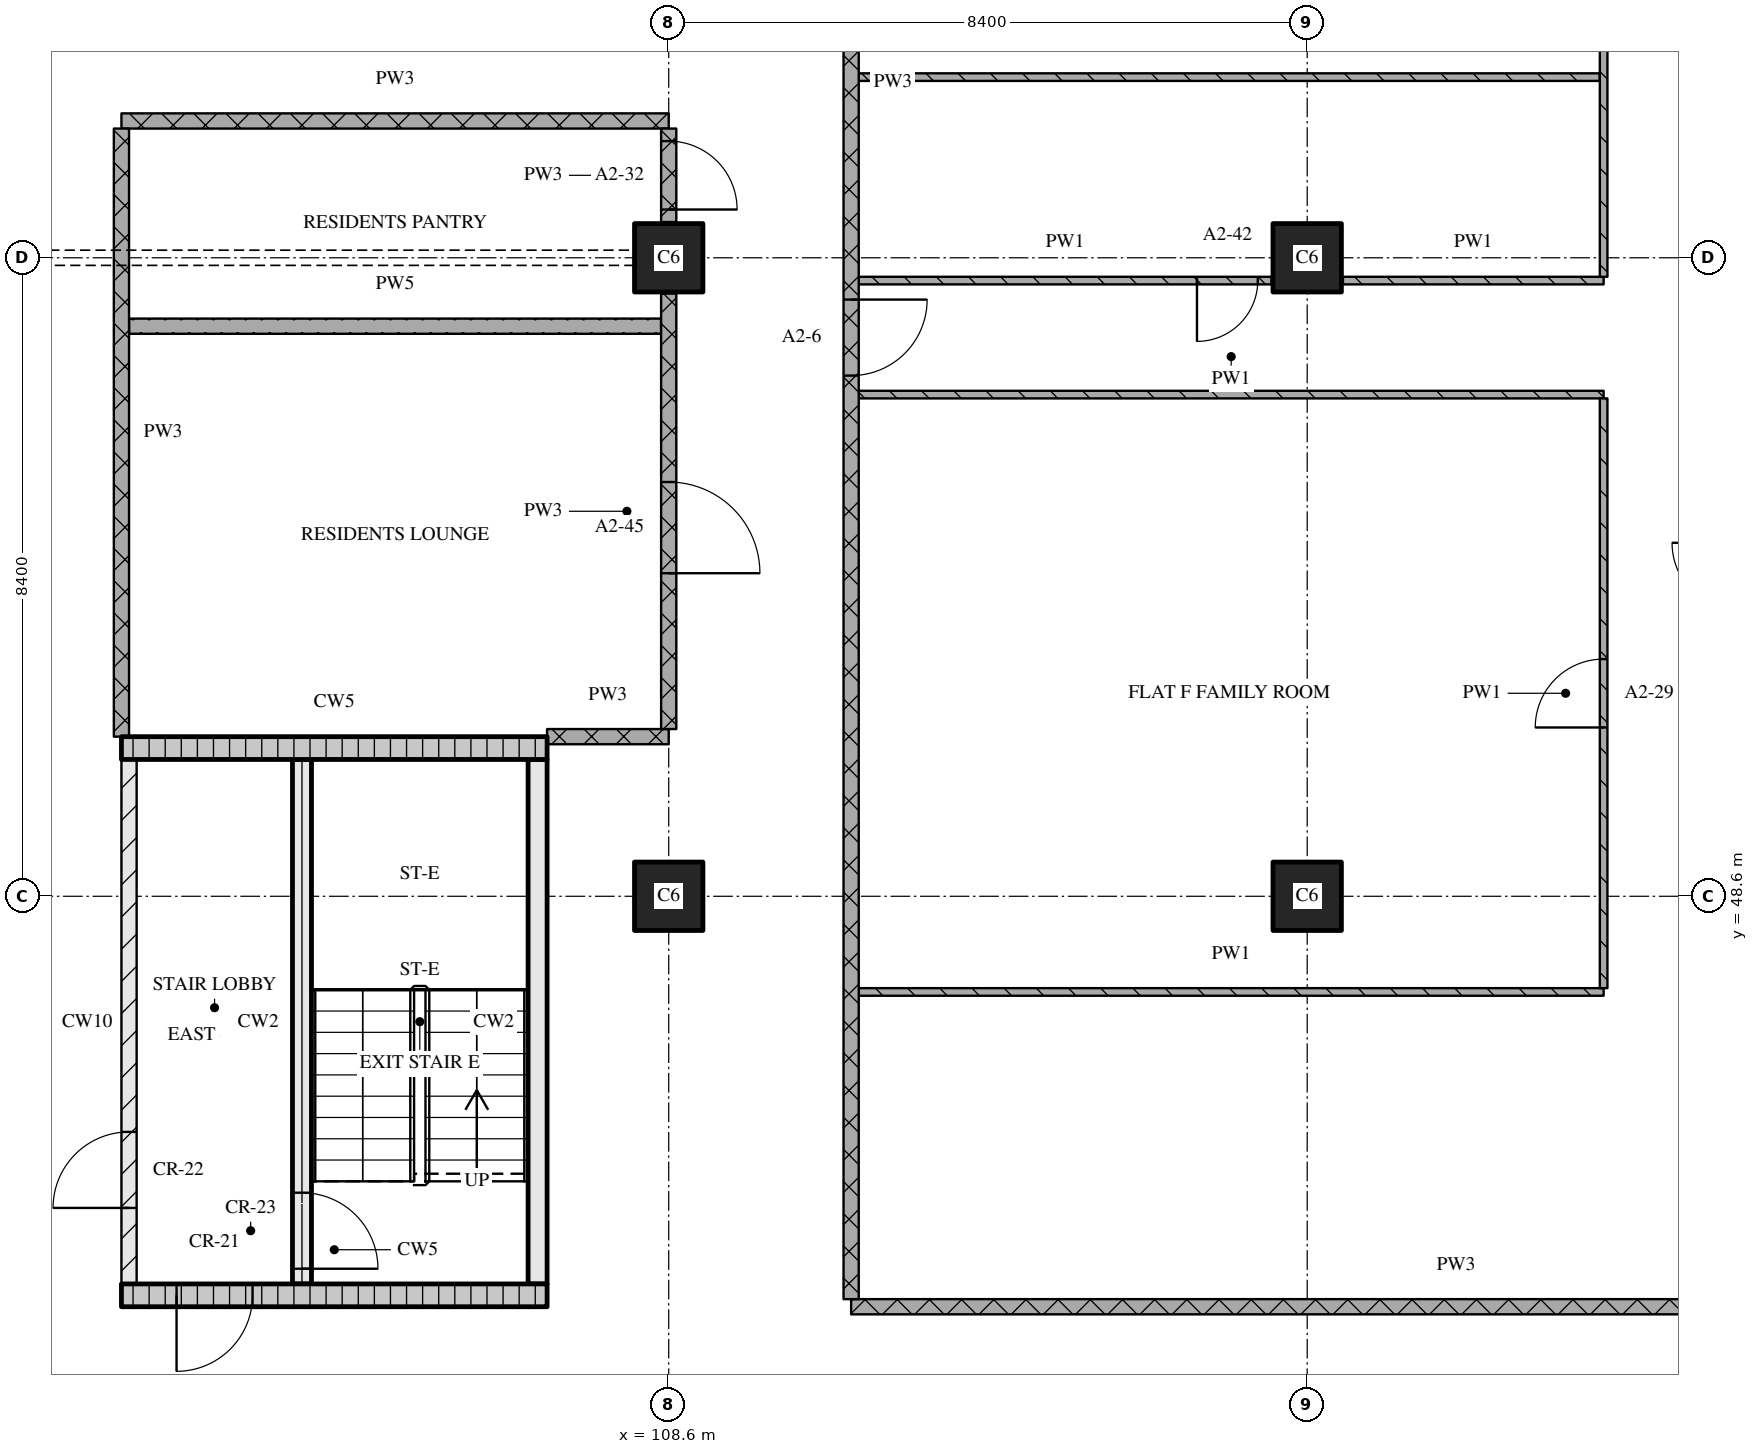
"""IFC4 building model, lengths in metres.
Left out: names, types, materials, properties, quantities, classifications, styles, units other than length and angle.
Written with IfcOpenShell. Run it as: python <this file> out.ifc"""

import sys

from ifc_helpers import new_model, si_unit, direction, frame, frame_2d, origin, origin_2d, place, context, subcontext, project, spatial, rectangle, extrude, element, fill, save


model = new_model("IFC4")
c1 = context("Model", 3, precision=1e-05, world=origin(), true_north=direction((0.0, 1.0)))
c2 = subcontext(c1, "Body", "Model", "MODEL_VIEW")
j1 = project(units=[si_unit("LENGTHUNIT", "METRE"), si_unit("PLANEANGLEUNIT", "RADIAN")], contexts=[c1])
p1 = place(None, origin())
s1 = spatial("IfcSite", under=j1, at=p1, CompositionType="ELEMENT")
p2 = place(p1, origin())
s2 = spatial("IfcBuilding", under=s1, at=p2, CompositionType="ELEMENT")
p3 = place(p2, frame((0.0, 0.0, 55.2)))
s3 = spatial("IfcBuildingStorey", under=s2, at=p3, CompositionType="ELEMENT", Elevation=55.2)
for number, where, z_axis, x_axis in (
    (1, (108.6, 48.6, 0.0), (0.0, 0.0, 1.0), (1.0, 0.0, 0.0)),
    (2, (108.6, 57.0, 0.0), (0.0, 0.0, 1.0), (1.0, 0.0, 0.0)),
    (3, (117.0, 48.6, 0.0), (0.0, 0.0, 1.0), (1.0, 0.0, 0.0)),
    (4, (117.0, 57.0, 0.0), (0.0, 0.0, 1.0), (1.0, 0.0, 0.0)),
):
    element("IfcColumn", number, at=place(p3, frame(where, z_axis=z_axis, x_axis=x_axis)), inside=s3, PredefinedType="COLUMN", context=c2, shape_type="SweptSolid", body=[
        extrude(rectangle(XDim=0.9, YDim=0.9, at=origin_2d()), origin(), (0.0, 0.0, 1.0), 3.6),
    ])
p4 = place(p3, frame((101.4, 43.35, 0.0), z_axis=(0.0, 0.0, 1.0), x_axis=(1.0, 0.0, 0.0)))
e5 = element("IfcWall", 5, at=p4, inside=s3, PredefinedType="SOLIDWALL", context=c2, shape_type="SweptSolid", body=[
    extrude(rectangle(XDim=5.6, YDim=0.3, at=frame_2d((2.8, 0.0))), origin(), (0.0, 0.0, 1.0), 3.32),
])
p5 = place(p4, frame((0.725, 0.0, 0.0)))
e6 = element("IfcOpeningElement", 6, at=p5, cuts=e5, PredefinedType="OPENING", context=c2, shape_type="SweptSolid", body=[
    extrude(rectangle(XDim=1.0, YDim=2.1, at=frame_2d((0.5, 1.05))), frame((0.0, 0.16, 0.0), z_axis=(0.0, -1.0, 0.0), x_axis=(1.0, 0.0, 0.0)), (0.0, 0.0, 1.0), 0.32),
])
p6 = place(p3, frame((101.5, 43.5, 0.0), z_axis=(0.0, 0.0, 1.0), x_axis=(0.0, 1.0, 0.0)))
e7 = element("IfcWall", 7, at=p6, inside=s3, PredefinedType="PARTITIONING", context=c2, shape_type="SweptSolid", body=[
    extrude(rectangle(XDim=6.9, YDim=0.2, at=frame_2d((3.45, 0.0))), origin(), (0.0, 0.0, 1.0), 3.32),
])
p7 = place(p6, frame((1.0, 0.0, 0.0)))
e8 = element("IfcOpeningElement", 8, at=p7, cuts=e7, PredefinedType="OPENING", context=c2, shape_type="SweptSolid", body=[
    extrude(rectangle(XDim=1.0, YDim=2.1, at=frame_2d((0.5, 1.05))), frame((0.0, 0.11, 0.0), z_axis=(0.0, -1.0, 0.0), x_axis=(1.0, 0.0, 0.0)), (0.0, 0.0, 1.0), 0.22),
])
p8 = place(p3, frame((103.775, 43.5, 0.0), z_axis=(0.0, 0.0, 1.0), x_axis=(0.0, 1.0, 0.0)))
e9 = element("IfcWall", 9, at=p8, inside=s3, PredefinedType="SOLIDWALL", context=c2, shape_type="SweptSolid", body=[
    extrude(rectangle(XDim=6.9, YDim=0.25, at=frame_2d((3.45, 0.0))), origin(), (0.0, 0.0, 1.0), 3.32),
])
p9 = place(p8, frame((0.2, 0.0, 0.0)))
e10 = element("IfcOpeningElement", 10, at=p9, cuts=e9, PredefinedType="OPENING", context=c2, shape_type="SweptSolid", body=[
    extrude(rectangle(XDim=1.0, YDim=2.1, at=frame_2d((0.5, 1.05))), frame((0.0, 0.135, 0.0), z_axis=(0.0, -1.0, 0.0), x_axis=(1.0, 0.0, 0.0)), (0.0, 0.0, 1.0), 0.27),
])
p10 = place(p3, frame((106.875, 43.5, 0.0), z_axis=(0.0, 0.0, 1.0), x_axis=(0.0, 1.0, 0.0)))
e11 = element("IfcWall", 11, at=p10, inside=s3, PredefinedType="SOLIDWALL", context=c2, shape_type="SweptSolid", body=[
    extrude(rectangle(XDim=6.9, YDim=0.25, at=frame_2d((3.45, 0.0))), origin(), (0.0, 0.0, 1.0), 3.32),
])
p11 = place(p3, frame((101.4, 50.55, 0.0), z_axis=(0.0, 0.0, 1.0), x_axis=(1.0, 0.0, 0.0)))
e12 = element("IfcWall", 12, at=p11, inside=s3, PredefinedType="SOLIDWALL", context=c2, shape_type="SweptSolid", body=[
    extrude(rectangle(XDim=5.6, YDim=0.3, at=frame_2d((2.8, 0.0))), origin(), (0.0, 0.0, 1.0), 3.32),
])
p12 = place(p3, frame((111.0, 43.2, 0.0), z_axis=(0.0, 0.0, 1.0), x_axis=(1.0, 0.0, 0.0)))
e13 = element("IfcWall", 13, at=p12, inside=s3, PredefinedType="PARTITIONING", context=c2, shape_type="SweptSolid", body=[
    extrude(rectangle(XDim=15.92, YDim=0.2, at=frame_2d((7.96, 0.0))), origin(), (0.0, 0.0, 1.0), 3.32),
])
p13 = place(p3, frame((111.1, 47.341, 0.0), z_axis=(0.0, 0.0, 1.0), x_axis=(1.0, 0.0, 0.0)))
e14 = element("IfcWall", 14, at=p13, inside=s3, PredefinedType="PARTITIONING", context=c2, shape_type="SweptSolid", body=[
    extrude(rectangle(XDim=9.8, YDim=0.1, at=frame_2d((4.9, 0.0))), origin(), (0.0, 0.0, 1.0), 3.32),
])
p14 = place(p3, frame((107.0, 50.7, 0.0), z_axis=(0.0, 0.0, 1.0), x_axis=(1.0, 0.0, 0.0)))
e15 = element("IfcWall", 15, at=p14, inside=s3, PredefinedType="PARTITIONING", context=c2, shape_type="SweptSolid", body=[
    extrude(rectangle(XDim=1.6, YDim=0.2, at=frame_2d((0.8, 0.0))), origin(), (0.0, 0.0, 1.0), 3.32),
])
p15 = place(p3, frame((111.1, 55.2, 0.0), z_axis=(0.0, 0.0, 1.0), x_axis=(1.0, 0.0, 0.0)))
e16 = element("IfcWall", 16, at=p15, inside=s3, PredefinedType="PARTITIONING", context=c2, shape_type="SweptSolid", body=[
    extrude(rectangle(XDim=9.8, YDim=0.1, at=frame_2d((4.9, 0.0))), origin(), (0.0, 0.0, 1.0), 3.32),
])
p16 = place(p3, frame((101.5, 56.1, 0.0), z_axis=(0.0, 0.0, 1.0), x_axis=(1.0, 0.0, 0.0)))
e17 = element("IfcWall", 17, at=p16, inside=s3, PredefinedType="PARTITIONING", context=c2, shape_type="SweptSolid", body=[
    extrude(rectangle(XDim=7.0, YDim=0.2, at=frame_2d((3.5, 0.0))), origin(), (0.0, 0.0, 1.0), 3.32),
])
p17 = place(p3, frame((111.1, 56.7, 0.0), z_axis=(0.0, 0.0, 1.0), x_axis=(1.0, 0.0, 0.0)))
e18 = element("IfcWall", 18, at=p17, inside=s3, PredefinedType="PARTITIONING", context=c2, shape_type="SweptSolid", body=[
    extrude(rectangle(XDim=5.43, YDim=0.1, at=frame_2d((2.715, 0.0))), origin(), (0.0, 0.0, 1.0), 3.32),
])
p18 = place(p17, frame((4.45, 0.0, 0.0)))
e19 = element("IfcOpeningElement", 19, at=p18, cuts=e18, PredefinedType="OPENING", context=c2, shape_type="SweptSolid", body=[
    extrude(rectangle(XDim=0.8, YDim=2.1, at=frame_2d((0.4, 1.05))), frame((0.0, 0.06, 0.0), z_axis=(0.0, -1.0, 0.0), x_axis=(1.0, 0.0, 0.0)), (0.0, 0.0, 1.0), 0.12),
])
p19 = place(p3, frame((117.47, 56.7, 0.0), z_axis=(0.0, 0.0, 1.0), x_axis=(1.0, 0.0, 0.0)))
e20 = element("IfcWall", 20, at=p19, inside=s3, PredefinedType="PARTITIONING", context=c2, shape_type="SweptSolid", body=[
    extrude(rectangle(XDim=3.43, YDim=0.1, at=frame_2d((1.715, 0.0))), origin(), (0.0, 0.0, 1.0), 3.32),
])
p20 = place(p3, frame((101.4, 58.8, 0.0), z_axis=(0.0, 0.0, 1.0), x_axis=(1.0, 0.0, 0.0)))
e21 = element("IfcWall", 21, at=p20, inside=s3, PredefinedType="PARTITIONING", context=c2, shape_type="SweptSolid", body=[
    extrude(rectangle(XDim=7.2, YDim=0.2, at=frame_2d((3.6, 0.0))), origin(), (0.0, 0.0, 1.0), 3.32),
])
p21 = place(p3, frame((111.1, 59.377, 0.0), z_axis=(0.0, 0.0, 1.0), x_axis=(1.0, 0.0, 0.0)))
e22 = element("IfcWall", 22, at=p21, inside=s3, PredefinedType="PARTITIONING", context=c2, shape_type="SweptSolid", body=[
    extrude(rectangle(XDim=9.75, YDim=0.1, at=frame_2d((4.875, 0.0))), origin(), (0.0, 0.0, 1.0), 3.32),
])
p22 = place(p3, frame((101.4, 58.7, 0.0), z_axis=(0.0, 0.0, 1.0), x_axis=(0.0, -1.0, 0.0)))
e23 = element("IfcWall", 23, at=p22, inside=s3, PredefinedType="PARTITIONING", context=c2, shape_type="SweptSolid", body=[
    extrude(rectangle(XDim=8.0, YDim=0.2, at=frame_2d((4.0, 0.0))), origin(), (0.0, 0.0, 1.0), 3.32),
])
p23 = place(p3, frame((108.6, 50.8, 0.0), z_axis=(0.0, 0.0, 1.0), x_axis=(0.0, 1.0, 0.0)))
e24 = element("IfcWall", 24, at=p23, inside=s3, PredefinedType="PARTITIONING", context=c2, shape_type="SweptSolid", body=[
    extrude(rectangle(XDim=5.73, YDim=0.2, at=frame_2d((2.865, 0.0))), origin(), (0.0, 0.0, 1.0), 3.32),
])
p24 = place(p23, frame((2.05, 0.0, 0.0)))
e25 = element("IfcOpeningElement", 25, at=p24, cuts=e24, PredefinedType="OPENING", context=c2, shape_type="SweptSolid", body=[
    extrude(rectangle(XDim=1.2, YDim=2.1, at=frame_2d((0.6, 1.05))), frame((0.0, 0.11, 0.0), z_axis=(0.0, -1.0, 0.0), x_axis=(1.0, 0.0, 0.0)), (0.0, 0.0, 1.0), 0.22),
])
p25 = place(p3, frame((108.6, 57.47, 0.0), z_axis=(0.0, 0.0, 1.0), x_axis=(0.0, 1.0, 0.0)))
e26 = element("IfcWall", 26, at=p25, inside=s3, PredefinedType="PARTITIONING", context=c2, shape_type="SweptSolid", body=[
    extrude(rectangle(XDim=1.23, YDim=0.2, at=frame_2d((0.615, 0.0))), origin(), (0.0, 0.0, 1.0), 3.32),
])
p26 = place(p25, frame((0.165, 0.0, 0.0)))
e27 = element("IfcOpeningElement", 27, at=p26, cuts=e26, PredefinedType="OPENING", context=c2, shape_type="SweptSolid", body=[
    extrude(rectangle(XDim=0.9, YDim=2.1, at=frame_2d((0.45, 1.05))), frame((0.0, 0.11, 0.0), z_axis=(0.0, -1.0, 0.0), x_axis=(1.0, 0.0, 0.0)), (0.0, 0.0, 1.0), 0.22),
])
p27 = place(p3, frame((111.0, 75.32, 0.0), z_axis=(0.0, 0.0, 1.0), x_axis=(0.0, -1.0, 0.0)))
e28 = element("IfcWall", 28, at=p27, inside=s3, PredefinedType="PARTITIONING", context=c2, shape_type="SweptSolid", body=[
    extrude(rectangle(XDim=32.02, YDim=0.2, at=frame_2d((16.01, 0.0))), origin(), (0.0, 0.0, 1.0), 3.32),
])
p28 = place(p27, frame((4.47, 0.0, 0.0)))
e29 = element("IfcOpeningElement", 29, at=p28, cuts=e28, PredefinedType="OPENING", context=c2, shape_type="SweptSolid", body=[
    extrude(rectangle(XDim=1.0, YDim=2.1, at=frame_2d((0.5, 1.05))), frame((0.0, 0.11, 0.0), z_axis=(0.0, -1.0, 0.0), x_axis=(1.0, 0.0, 0.0)), (0.0, 0.0, 1.0), 0.22),
])
p29 = place(p27, frame((18.87, 0.0, 0.0)))
e30 = element("IfcOpeningElement", 30, at=p29, cuts=e28, PredefinedType="OPENING", context=c2, shape_type="SweptSolid", body=[
    extrude(rectangle(XDim=1.0, YDim=2.1, at=frame_2d((0.5, 1.05))), frame((0.0, 0.11, 0.0), z_axis=(0.0, -1.0, 0.0), x_axis=(1.0, 0.0, 0.0)), (0.0, 0.0, 1.0), 0.22),
])
p30 = place(p3, frame((120.9, 47.391, 0.0), z_axis=(0.0, 0.0, 1.0), x_axis=(0.0, 1.0, 0.0)))
e31 = element("IfcWall", 31, at=p30, inside=s3, PredefinedType="PARTITIONING", context=c2, shape_type="SweptSolid", body=[
    extrude(rectangle(XDim=7.759, YDim=0.1, at=frame_2d((3.879, 0.0))), origin(), (0.0, 0.0, 1.0), 3.32),
])
p31 = place(p30, frame((3.429, 0.0, 0.0)))
e32 = element("IfcOpeningElement", 32, at=p31, cuts=e31, PredefinedType="OPENING", context=c2, shape_type="SweptSolid", body=[
    extrude(rectangle(XDim=0.9, YDim=2.1, at=frame_2d((0.45, 1.05))), frame((0.0, 0.06, 0.0), z_axis=(0.0, -1.0, 0.0), x_axis=(1.0, 0.0, 0.0)), (0.0, 0.0, 1.0), 0.12),
])
p32 = place(p3, frame((120.9, 56.75, 0.0), z_axis=(0.0, 0.0, 1.0), x_axis=(0.0, 1.0, 0.0)))
e33 = element("IfcWall", 33, at=p32, inside=s3, PredefinedType="PARTITIONING", context=c2, shape_type="SweptSolid", body=[
    extrude(rectangle(XDim=8.55, YDim=0.1, at=frame_2d((4.275, 0.0))), origin(), (0.0, 0.0, 1.0), 3.32),
])
p33 = place(p32, frame((3.565, 0.0, 0.0)))
e34 = element("IfcOpeningElement", 34, at=p33, cuts=e33, PredefinedType="OPENING", context=c2, shape_type="SweptSolid", body=[
    extrude(rectangle(XDim=0.8, YDim=2.1, at=frame_2d((0.4, 1.05))), frame((0.0, 0.06, 0.0), z_axis=(0.0, -1.0, 0.0), x_axis=(1.0, 0.0, 0.0)), (0.0, 0.0, 1.0), 0.12),
])
p34 = place(p32, frame((6.527, 0.0, 0.0)))
e35 = element("IfcOpeningElement", 35, at=p34, cuts=e33, PredefinedType="OPENING", context=c2, shape_type="SweptSolid", body=[
    extrude(rectangle(XDim=0.9, YDim=2.1, at=frame_2d((0.45, 1.05))), frame((0.0, 0.06, 0.0), z_axis=(0.0, -1.0, 0.0), x_axis=(1.0, 0.0, 0.0)), (0.0, 0.0, 1.0), 0.12),
])
p35 = place(p5, origin())
e36 = element("IfcDoor", 36, at=p35, inside=s3, OperationType="SINGLE_SWING_RIGHT", PredefinedType="DOOR", context=c2, shape_type="SweptSolid", body=[
    extrude(rectangle(XDim=1.0, YDim=2.1, at=frame_2d((0.5, 1.05))), frame((0.0, 0.025, 0.0), z_axis=(0.0, -1.0, 0.0), x_axis=(1.0, 0.0, 0.0)), (0.0, 0.0, 1.0), 0.05),
])
fill(e6, e36)
p36 = place(p9, origin())
e37 = element("IfcDoor", 37, at=p36, inside=s3, OperationType="SINGLE_SWING_RIGHT", PredefinedType="DOOR", context=c2, shape_type="SweptSolid", body=[
    extrude(rectangle(XDim=1.0, YDim=2.1, at=frame_2d((0.5, 1.05))), frame((0.0, 0.025, 0.0), z_axis=(0.0, -1.0, 0.0), x_axis=(1.0, 0.0, 0.0)), (0.0, 0.0, 1.0), 0.05),
])
fill(e10, e37)
p37 = place(p7, origin())
e38 = element("IfcDoor", 38, at=p37, inside=s3, OperationType="SINGLE_SWING_LEFT", PredefinedType="DOOR", context=c2, shape_type="SweptSolid", body=[
    extrude(rectangle(XDim=1.0, YDim=2.1, at=frame_2d((0.5, 1.05))), frame((0.0, 0.025, 0.0), z_axis=(0.0, -1.0, 0.0), x_axis=(1.0, 0.0, 0.0)), (0.0, 0.0, 1.0), 0.05),
])
fill(e8, e38)
p38 = place(p18, origin())
e39 = element("IfcDoor", 39, at=p38, inside=s3, OperationType="SINGLE_SWING_RIGHT", PredefinedType="DOOR", context=c2, shape_type="SweptSolid", body=[
    extrude(rectangle(XDim=0.8, YDim=2.1, at=frame_2d((0.4, 1.05))), frame((0.0, 0.025, 0.0), z_axis=(0.0, -1.0, 0.0), x_axis=(1.0, 0.0, 0.0)), (0.0, 0.0, 1.0), 0.05),
])
fill(e19, e39)
p39 = place(p24, origin())
e40 = element("IfcDoor", 40, at=p39, inside=s3, OperationType="SINGLE_SWING_RIGHT", PredefinedType="DOOR", context=c2, shape_type="SweptSolid", body=[
    extrude(rectangle(XDim=1.2, YDim=2.1, at=frame_2d((0.6, 1.05))), frame((0.0, 0.025, 0.0), z_axis=(0.0, -1.0, 0.0), x_axis=(1.0, 0.0, 0.0)), (0.0, 0.0, 1.0), 0.05),
])
fill(e25, e40)
p40 = place(p26, origin())
e41 = element("IfcDoor", 41, at=p40, inside=s3, OperationType="SINGLE_SWING_RIGHT", PredefinedType="DOOR", context=c2, shape_type="SweptSolid", body=[
    extrude(rectangle(XDim=0.9, YDim=2.1, at=frame_2d((0.45, 1.05))), frame((0.0, 0.025, 0.0), z_axis=(0.0, -1.0, 0.0), x_axis=(1.0, 0.0, 0.0)), (0.0, 0.0, 1.0), 0.05),
])
fill(e27, e41)
p41 = place(p29, origin())
e42 = element("IfcDoor", 42, at=p41, inside=s3, OperationType="SINGLE_SWING_LEFT", PredefinedType="DOOR", context=c2, shape_type="SweptSolid", body=[
    extrude(rectangle(XDim=1.0, YDim=2.1, at=frame_2d((0.5, 1.05))), frame((0.0, 0.025, 0.0), z_axis=(0.0, -1.0, 0.0), x_axis=(1.0, 0.0, 0.0)), (0.0, 0.0, 1.0), 0.05),
])
fill(e30, e42)
p42 = place(p31, origin())
e43 = element("IfcDoor", 43, at=p42, inside=s3, OperationType="SINGLE_SWING_LEFT", PredefinedType="DOOR", context=c2, shape_type="SweptSolid", body=[
    extrude(rectangle(XDim=0.9, YDim=2.1, at=frame_2d((0.45, 1.05))), frame((0.0, 0.025, 0.0), z_axis=(0.0, -1.0, 0.0), x_axis=(1.0, 0.0, 0.0)), (0.0, 0.0, 1.0), 0.05),
])
fill(e32, e43)
save(model, sys.argv[1])
